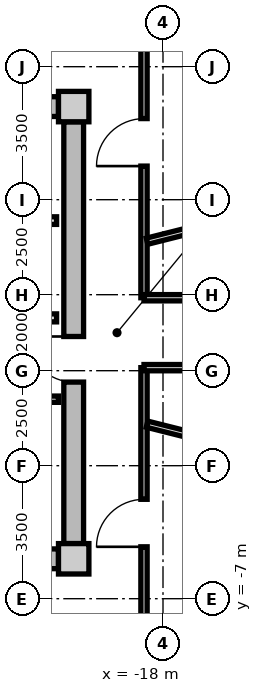
"""IFC4 building model, lengths in metres.
Left out: names, types, materials, properties, quantities, classifications, styles, units other than length and angle.
Written with IfcOpenShell. Run it as: python <this file> out.ifc"""

import sys

from ifc_helpers import new_model, si_unit, direction, frame, frame_2d, origin, origin_2d, place, context, subcontext, project, spatial, rectangle, extrude, source, transform, mapped, element, fill, save


model = new_model("IFC4")
c1 = context("Model", 3, precision=1e-05, world=origin(), true_north=direction((0.0, 1.0)))
c2 = subcontext(c1, "Body", "Model", "MODEL_VIEW")
j1 = project(units=[si_unit("LENGTHUNIT", "METRE"), si_unit("PLANEANGLEUNIT", "RADIAN")], contexts=[c1])
p1 = place(None, origin())
s1 = spatial("IfcSite", under=j1, at=p1, CompositionType="ELEMENT")
p2 = place(p1, origin())
s2 = spatial("IfcBuilding", under=s1, at=p2, CompositionType="ELEMENT")
p3 = place(p2, frame((0.0, 0.0, 199.8)))
s3 = spatial("IfcBuildingStorey", under=s2, at=p3, CompositionType="ELEMENT", Elevation=199.8)
m1 = source(origin(), c2, "Body", "SweptSolid", [
    extrude(rectangle(XDim=0.8, YDim=0.8, at=origin_2d()), origin(), (0.0, 0.0, 1.0), 4.0),
])
for number, where, z_axis, x_axis in (
    (1, (-20.35, -5.95, 0.0), (0.0, 0.0, 1.0), (1.0, 0.0, 0.0)),
    (2, (-20.35, 5.95, 0.0), (0.0, 0.0, 1.0), (1.0, 0.0, 0.0)),
):
    element("IfcColumn", number, at=place(p3, frame(where, z_axis=z_axis, x_axis=x_axis)), inside=s3, PredefinedType="COLUMN", context=c2, shape_type="MappedRepresentation", body=[
        mapped(m1, transform((0.0, 0.0, 0.0), x_axis=(1.0, 0.0, 0.0), y_axis=(0.0, 1.0, 0.0), z_axis=(0.0, 0.0, 1.0), scale=1.0)),
    ])
m2 = source(origin(), c2, "Body", "SweptSolid", [
    extrude(rectangle(XDim=14.5, YDim=0.52, at=frame_2d((7.25, 0.0))), origin(), (0.0, 0.0, 1.0), 3.71),
])
for number, where, z_axis, x_axis in (
    (3, (-35.25, 5.95, 0.0), (0.0, 0.0, 1.0), (1.0, 0.0, 0.0)),
    (4, (-20.75, -5.95, 0.0), (0.0, 0.0, 1.0), (-1.0, 0.0, 0.0)),
):
    element("IfcWall", number, at=place(p3, frame(where, z_axis=z_axis, x_axis=x_axis)), inside=s3, PredefinedType="SHEAR", context=c2, shape_type="MappedRepresentation", body=[
        mapped(m2, transform((0.0, 0.0, 0.0), x_axis=(1.0, 0.0, 0.0), y_axis=(0.0, 1.0, 0.0), z_axis=(0.0, 0.0, 1.0), scale=1.0)),
    ])
m3 = source(origin(), c2, "Body", "SweptSolid", [
    extrude(rectangle(XDim=11.1, YDim=0.52, at=frame_2d((5.55, 0.0))), origin(), (0.0, 0.0, 1.0), 3.71),
])
p4 = place(p3, frame((-20.35, 5.55, 0.0), z_axis=(0.0, 0.0, 1.0), x_axis=(0.0, -1.0, 0.0)))
e5 = element("IfcWall", 5, at=p4, inside=s3, PredefinedType="SHEAR", context=c2, shape_type="MappedRepresentation", body=[
    mapped(m3, transform((0.0, 0.0, 0.0), x_axis=(1.0, 0.0, 0.0), y_axis=(0.0, 1.0, 0.0), z_axis=(0.0, 0.0, 1.0), scale=1.0)),
])
p5 = place(p4, frame((5.65, 0.0, 0.0)))
e6 = element("IfcOpeningElement", 6, at=p5, cuts=e5, PredefinedType="OPENING", context=c2, shape_type="SweptSolid", body=[
    extrude(rectangle(XDim=1.2, YDim=2.15, at=frame_2d((0.6, 1.075))), frame((0.0, 0.27, 0.0), z_axis=(0.0, -1.0, 0.0), x_axis=(1.0, 0.0, 0.0)), (0.0, 0.0, 1.0), 0.54),
])
m4 = source(origin(), c2, "Body", "SweptSolid", [
    extrude(rectangle(XDim=3.2, YDim=0.2, at=frame_2d((1.6, 0.0))), origin(), (0.0, 0.0, 1.0), 3.695),
])
p6 = place(p3, frame((-24.0, 2.95, 0.0), z_axis=(0.0, 0.0, 1.0), x_axis=(1.0, 0.0, 0.0)))
e7 = element("IfcWall", 7, at=p6, inside=s3, PredefinedType="PARTITIONING", context=c2, shape_type="MappedRepresentation", body=[
    mapped(m4, transform((0.0, 0.0, 0.0), x_axis=(1.0, 0.0, 0.0), y_axis=(0.0, 1.0, 0.0), z_axis=(0.0, 0.0, 1.0), scale=1.0)),
])
m5 = source(origin(), c2, "Body", "SweptSolid", [
    extrude(rectangle(XDim=6.66, YDim=0.21, at=frame_2d((3.33, 0.0))), origin(), (0.0, 0.0, 1.0), 3.695),
])
p7 = place(p3, frame((-27.46, 0.39, 0.0), z_axis=(0.0, 0.0, 1.0), x_axis=(1.0, 0.0, 0.0)))
e8 = element("IfcWall", 8, at=p7, inside=s3, PredefinedType="PARTITIONING", context=c2, shape_type="MappedRepresentation", body=[
    mapped(m5, transform((0.0, 0.0, 0.0), x_axis=(1.0, 0.0, 0.0), y_axis=(0.0, 1.0, 0.0), z_axis=(0.0, 0.0, 1.0), scale=1.0)),
])
p8 = place(p7, frame((1.0, 0.0, 0.0)))
e9 = element("IfcOpeningElement", 9, at=p8, cuts=e8, PredefinedType="OPENING", context=c2, shape_type="SweptSolid", body=[
    extrude(rectangle(XDim=1.2, YDim=2.15, at=frame_2d((0.6, 1.075))), frame((0.0, 0.115, 0.0), z_axis=(0.0, -1.0, 0.0), x_axis=(1.0, 0.0, 0.0)), (0.0, 0.0, 1.0), 0.23),
])
m6 = source(origin(), c2, "Body", "SweptSolid", [
    extrude(rectangle(XDim=2.7, YDim=0.165, at=frame_2d((1.35, 0.0))), origin(), (0.0, 0.0, 1.0), 3.695),
])
p9 = place(p3, frame((-23.45, -1.75, 0.0), z_axis=(0.0, 0.0, 1.0), x_axis=(1.0, 0.0, 0.0)))
e10 = element("IfcWall", 10, at=p9, inside=s3, PredefinedType="PARTITIONING", context=c2, shape_type="MappedRepresentation", body=[
    mapped(m6, transform((0.0, 0.0, 0.0), x_axis=(1.0, 0.0, 0.0), y_axis=(0.0, 1.0, 0.0), z_axis=(0.0, 0.0, 1.0), scale=1.0)),
])
p10 = place(p9, frame((0.222, 0.0, 0.0)))
e11 = element("IfcOpeningElement", 11, at=p10, cuts=e10, PredefinedType="OPENING", context=c2, shape_type="SweptSolid", body=[
    extrude(rectangle(XDim=0.925, YDim=2.1, at=frame_2d((0.462, 1.05))), frame((0.0, 0.093, 0.0), z_axis=(0.0, -1.0, 0.0), x_axis=(1.0, 0.0, 0.0)), (0.0, 0.0, 1.0), 0.185),
])
p11 = place(p9, frame((1.522, 0.0, 0.0)))
e12 = element("IfcOpeningElement", 12, at=p11, cuts=e10, PredefinedType="OPENING", context=c2, shape_type="SweptSolid", body=[
    extrude(rectangle(XDim=0.925, YDim=2.1, at=frame_2d((0.462, 1.05))), frame((0.0, 0.093, 0.0), z_axis=(0.0, -1.0, 0.0), x_axis=(1.0, 0.0, 0.0)), (0.0, 0.0, 1.0), 0.185),
])
m7 = source(origin(), c2, "Body", "SweptSolid", [
    extrude(rectangle(XDim=6.88, YDim=0.165, at=frame_2d((3.44, 0.0))), origin(), (0.0, 0.0, 1.0), 3.695),
])
p12 = place(p3, frame((-18.5, 7.8, 0.0), z_axis=(0.0, 0.0, 1.0), x_axis=(0.0, -1.0, 0.0)))
e13 = element("IfcWall", 13, at=p12, inside=s3, PredefinedType="PARTITIONING", context=c2, shape_type="MappedRepresentation", body=[
    mapped(m7, transform((0.0, 0.0, 0.0), x_axis=(1.0, 0.0, 0.0), y_axis=(0.0, 1.0, 0.0), z_axis=(0.0, 0.0, 1.0), scale=1.0)),
])
p13 = place(p12, frame((2.166, 0.0, 0.0)))
e14 = element("IfcOpeningElement", 14, at=p13, cuts=e13, PredefinedType="OPENING", context=c2, shape_type="SweptSolid", body=[
    extrude(rectangle(XDim=1.25, YDim=2.2, at=frame_2d((0.625, 1.1))), frame((0.0, 0.093, 0.0), z_axis=(0.0, -1.0, 0.0), x_axis=(1.0, 0.0, 0.0)), (0.0, 0.0, 1.0), 0.185),
])
p14 = place(p3, frame((-18.5, -0.92, 0.0), z_axis=(0.0, 0.0, 1.0), x_axis=(0.0, -1.0, 0.0)))
e15 = element("IfcWall", 15, at=p14, inside=s3, PredefinedType="PARTITIONING", context=c2, shape_type="MappedRepresentation", body=[
    mapped(m7, transform((0.0, 0.0, 0.0), x_axis=(1.0, 0.0, 0.0), y_axis=(0.0, 1.0, 0.0), z_axis=(0.0, 0.0, 1.0), scale=1.0)),
])
p15 = place(p14, frame((3.464, 0.0, 0.0)))
e16 = element("IfcOpeningElement", 16, at=p15, cuts=e15, PredefinedType="OPENING", context=c2, shape_type="SweptSolid", body=[
    extrude(rectangle(XDim=1.25, YDim=2.2, at=frame_2d((0.625, 1.1))), frame((0.0, 0.093, 0.0), z_axis=(0.0, -1.0, 0.0), x_axis=(1.0, 0.0, 0.0)), (0.0, 0.0, 1.0), 0.185),
])
m8 = source(origin(), c2, "Body", "SweptSolid", [
    extrude(rectangle(XDim=6.157, YDim=0.165, at=frame_2d((3.079, 0.0))), origin(), (0.0, 0.0, 1.0), 3.295),
])
for number, where, z_axis, x_axis in (
    (17, (-18.42, -2.407, 0.0), (0.0, 0.0, 1.0), (0.97, -0.244, 0.0)),
    (18, (-18.42, 2.407, 0.0), (0.0, 0.0, 1.0), (0.97, 0.244, 0.0)),
):
    element("IfcWall", number, at=place(p3, frame(where, z_axis=z_axis, x_axis=x_axis)), inside=s3, PredefinedType="PARTITIONING", context=c2, shape_type="MappedRepresentation", body=[
        mapped(m8, transform((0.0, 0.0, 0.0), x_axis=(1.0, 0.0, 0.0), y_axis=(0.0, 1.0, 0.0), z_axis=(0.0, 0.0, 1.0), scale=1.0)),
    ])
m9 = source(origin(), c2, "Body", "SweptSolid", [
    extrude(rectangle(XDim=37.0, YDim=0.165, at=frame_2d((18.5, 0.0))), origin(), (0.0, 0.0, 1.0), 3.695),
])
p16 = place(p3, frame((-18.5, -0.92, 0.0), z_axis=(0.0, 0.0, 1.0), x_axis=(1.0, 0.0, 0.0)))
e19 = element("IfcWall", 19, at=p16, inside=s3, PredefinedType="PARTITIONING", context=c2, shape_type="MappedRepresentation", body=[
    mapped(m9, transform((0.0, 0.0, 0.0), x_axis=(1.0, 0.0, 0.0), y_axis=(0.0, 1.0, 0.0), z_axis=(0.0, 0.0, 1.0), scale=1.0)),
])
p17 = place(p16, frame((2.662, 0.0, 0.0)))
e20 = element("IfcOpeningElement", 20, at=p17, cuts=e19, PredefinedType="OPENING", context=c2, shape_type="SweptSolid", body=[
    extrude(rectangle(XDim=0.95, YDim=2.1, at=frame_2d((0.475, 1.05))), frame((0.0, 0.093, 0.0), z_axis=(0.0, -1.0, 0.0), x_axis=(1.0, 0.0, 0.0)), (0.0, 0.0, 1.0), 0.185),
])
p18 = place(p16, frame((33.388, 0.0, 0.0)))
e21 = element("IfcOpeningElement", 21, at=p18, cuts=e19, PredefinedType="OPENING", context=c2, shape_type="SweptSolid", body=[
    extrude(rectangle(XDim=0.95, YDim=2.1, at=frame_2d((0.475, 1.05))), frame((0.0, 0.093, 0.0), z_axis=(0.0, -1.0, 0.0), x_axis=(1.0, 0.0, 0.0)), (0.0, 0.0, 1.0), 0.185),
])
p19 = place(p16, frame((9.075, 0.0, 0.0)))
e22 = element("IfcOpeningElement", 22, at=p19, cuts=e19, PredefinedType="OPENING", context=c2, shape_type="SweptSolid", body=[
    extrude(rectangle(XDim=1.25, YDim=2.2, at=frame_2d((0.625, 1.1))), frame((0.0, 0.093, 0.0), z_axis=(0.0, -1.0, 0.0), x_axis=(1.0, 0.0, 0.0)), (0.0, 0.0, 1.0), 0.185),
])
p20 = place(p16, frame((17.875, 0.0, 0.0)))
e23 = element("IfcOpeningElement", 23, at=p20, cuts=e19, PredefinedType="OPENING", context=c2, shape_type="SweptSolid", body=[
    extrude(rectangle(XDim=1.25, YDim=2.2, at=frame_2d((0.625, 1.1))), frame((0.0, 0.093, 0.0), z_axis=(0.0, -1.0, 0.0), x_axis=(1.0, 0.0, 0.0)), (0.0, 0.0, 1.0), 0.185),
])
p21 = place(p16, frame((26.675, 0.0, 0.0)))
e24 = element("IfcOpeningElement", 24, at=p21, cuts=e19, PredefinedType="OPENING", context=c2, shape_type="SweptSolid", body=[
    extrude(rectangle(XDim=1.25, YDim=2.2, at=frame_2d((0.625, 1.1))), frame((0.0, 0.093, 0.0), z_axis=(0.0, -1.0, 0.0), x_axis=(1.0, 0.0, 0.0)), (0.0, 0.0, 1.0), 0.185),
])
p22 = place(p3, frame((-18.5, 0.92, 0.0), z_axis=(0.0, 0.0, 1.0), x_axis=(1.0, 0.0, 0.0)))
e25 = element("IfcWall", 25, at=p22, inside=s3, PredefinedType="PARTITIONING", context=c2, shape_type="MappedRepresentation", body=[
    mapped(m9, transform((0.0, 0.0, 0.0), x_axis=(1.0, 0.0, 0.0), y_axis=(0.0, 1.0, 0.0), z_axis=(0.0, 0.0, 1.0), scale=1.0)),
])
p23 = place(p22, frame((2.662, 0.0, 0.0)))
e26 = element("IfcOpeningElement", 26, at=p23, cuts=e25, PredefinedType="OPENING", context=c2, shape_type="SweptSolid", body=[
    extrude(rectangle(XDim=0.95, YDim=2.1, at=frame_2d((0.475, 1.05))), frame((0.0, 0.093, 0.0), z_axis=(0.0, -1.0, 0.0), x_axis=(1.0, 0.0, 0.0)), (0.0, 0.0, 1.0), 0.185),
])
p24 = place(p22, frame((33.388, 0.0, 0.0)))
e27 = element("IfcOpeningElement", 27, at=p24, cuts=e25, PredefinedType="OPENING", context=c2, shape_type="SweptSolid", body=[
    extrude(rectangle(XDim=0.95, YDim=2.1, at=frame_2d((0.475, 1.05))), frame((0.0, 0.093, 0.0), z_axis=(0.0, -1.0, 0.0), x_axis=(1.0, 0.0, 0.0)), (0.0, 0.0, 1.0), 0.185),
])
p25 = place(p22, frame((7.64, 0.0, 0.0)))
e28 = element("IfcOpeningElement", 28, at=p25, cuts=e25, PredefinedType="OPENING", context=c2, shape_type="SweptSolid", body=[
    extrude(rectangle(XDim=0.92, YDim=2.1, at=frame_2d((0.46, 1.05))), frame((0.0, 0.093, 0.0), z_axis=(0.0, -1.0, 0.0), x_axis=(1.0, 0.0, 0.0)), (0.0, 0.0, 1.0), 0.185),
])
p26 = place(p22, frame((10.275, 0.0, 0.0)))
e29 = element("IfcOpeningElement", 29, at=p26, cuts=e25, PredefinedType="OPENING", context=c2, shape_type="SweptSolid", body=[
    extrude(rectangle(XDim=1.25, YDim=2.2, at=frame_2d((0.625, 1.1))), frame((0.0, 0.093, 0.0), z_axis=(0.0, -1.0, 0.0), x_axis=(1.0, 0.0, 0.0)), (0.0, 0.0, 1.0), 0.185),
])
p27 = place(p22, frame((17.875, 0.0, 0.0)))
e30 = element("IfcOpeningElement", 30, at=p27, cuts=e25, PredefinedType="OPENING", context=c2, shape_type="SweptSolid", body=[
    extrude(rectangle(XDim=1.25, YDim=2.2, at=frame_2d((0.625, 1.1))), frame((0.0, 0.093, 0.0), z_axis=(0.0, -1.0, 0.0), x_axis=(1.0, 0.0, 0.0)), (0.0, 0.0, 1.0), 0.185),
])
p28 = place(p22, frame((26.675, 0.0, 0.0)))
e31 = element("IfcOpeningElement", 31, at=p28, cuts=e25, PredefinedType="OPENING", context=c2, shape_type="SweptSolid", body=[
    extrude(rectangle(XDim=1.25, YDim=2.2, at=frame_2d((0.625, 1.1))), frame((0.0, 0.093, 0.0), z_axis=(0.0, -1.0, 0.0), x_axis=(1.0, 0.0, 0.0)), (0.0, 0.0, 1.0), 0.185),
])
m10 = source(origin(), c2, "Body", "SweptSolid", [
    extrude(rectangle(XDim=1.2, YDim=2.15, at=frame_2d((0.6, 1.075))), frame((0.0, 0.025, 0.0), z_axis=(0.0, -1.0, 0.0), x_axis=(1.0, 0.0, 0.0)), (0.0, 0.0, 1.0), 0.05),
])
p29 = place(p5, frame((1.2, 0.0, 0.0), z_axis=(0.0, 0.0, 1.0), x_axis=(-1.0, 0.0, 0.0)))
e32 = element("IfcDoor", 32, at=p29, inside=s3, OperationType="SINGLE_SWING_RIGHT", PredefinedType="DOOR", context=c2, shape_type="MappedRepresentation", body=[
    mapped(m10, transform((0.0, 0.0, 0.0), x_axis=(1.0, 0.0, 0.0), y_axis=(0.0, 1.0, 0.0), z_axis=(0.0, 0.0, 1.0), scale=1.0)),
])
fill(e6, e32)
m11 = source(origin(), c2, "Body", "SweptSolid", [
    extrude(rectangle(XDim=1.25, YDim=2.2, at=frame_2d((0.625, 1.1))), frame((0.0, 0.025, 0.0), z_axis=(0.0, -1.0, 0.0), x_axis=(1.0, 0.0, 0.0)), (0.0, 0.0, 1.0), 0.05),
])
p30 = place(p13, frame((1.25, 0.0, 0.0), z_axis=(0.0, 0.0, 1.0), x_axis=(-1.0, 0.0, 0.0)))
e33 = element("IfcDoor", 33, at=p30, inside=s3, OperationType="SINGLE_SWING_LEFT", PredefinedType="DOOR", context=c2, shape_type="MappedRepresentation", body=[
    mapped(m11, transform((0.0, 0.0, 0.0), x_axis=(1.0, 0.0, 0.0), y_axis=(0.0, 1.0, 0.0), z_axis=(0.0, 0.0, 1.0), scale=1.0)),
])
fill(e14, e33)
p31 = place(p15, frame((1.25, 0.0, 0.0), z_axis=(0.0, 0.0, 1.0), x_axis=(-1.0, 0.0, 0.0)))
e34 = element("IfcDoor", 34, at=p31, inside=s3, OperationType="SINGLE_SWING_LEFT", PredefinedType="DOOR", context=c2, shape_type="MappedRepresentation", body=[
    mapped(m11, transform((0.0, 0.0, 0.0), x_axis=(1.0, 0.0, 0.0), y_axis=(0.0, 1.0, 0.0), z_axis=(0.0, 0.0, 1.0), scale=1.0)),
])
fill(e16, e34)
save(model, sys.argv[1])
